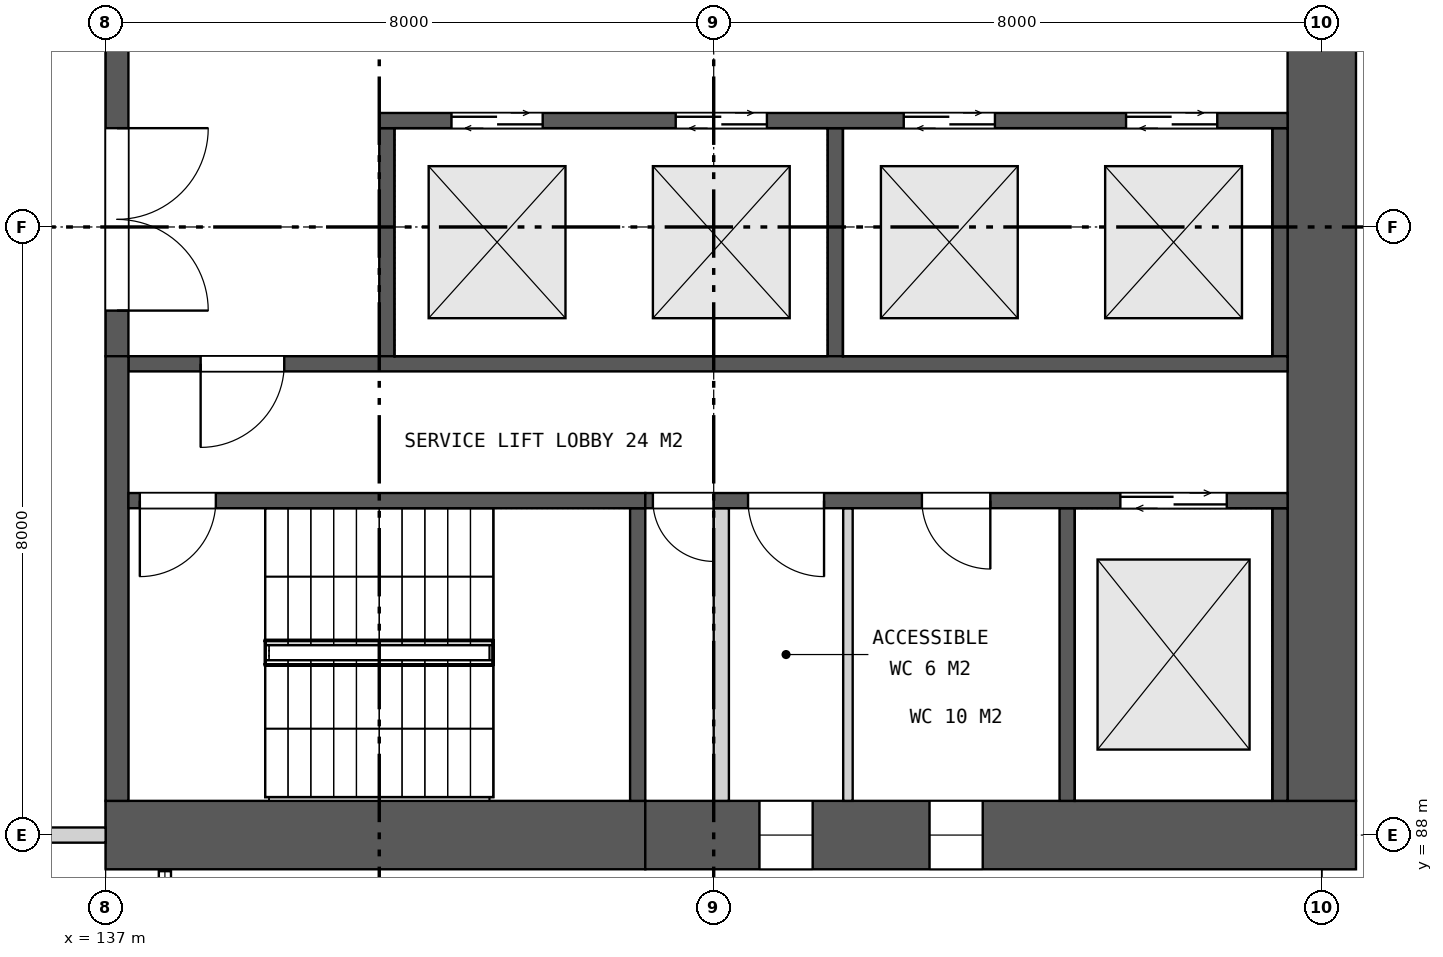
"""IFC4 building model, lengths in metres.
Left out: names, types, materials, properties, quantities, classifications, styles, units other than length and angle.
Written with IfcOpenShell. Run it as: python <this file> out.ifc"""

import sys

from ifc_helpers import new_model, si_unit, direction, frame, frame_2d, origin, place, context, subcontext, project, spatial, rectangle, extrude, element, fill, save


model = new_model("IFC4")
c1 = context("Model", 3, precision=1e-05, world=origin(), true_north=direction((0.0, 1.0)))
c2 = subcontext(c1, "Body", "Model", "MODEL_VIEW")
j1 = project(units=[si_unit("LENGTHUNIT", "METRE"), si_unit("PLANEANGLEUNIT", "RADIAN")], contexts=[c1])
p1 = place(None, origin())
s1 = spatial("IfcSite", under=j1, at=p1, CompositionType="ELEMENT")
p2 = place(p1, origin())
s2 = spatial("IfcBuilding", under=s1, at=p2, CompositionType="ELEMENT")
p3 = place(p2, frame((0.0, 0.0, 41.5)))
s3 = spatial("IfcBuildingStorey", under=s2, at=p3, CompositionType="ELEMENT", Elevation=41.5)
p4 = place(p3, frame((137.0, 88.0, 0.0), z_axis=(0.0, 0.0, 1.0), x_axis=(1.0, 0.0, 0.0)))
e1 = element("IfcWall", 1, at=p4, inside=s3, PredefinedType="SHEAR", context=c2, shape_type="SweptSolid", body=[
    extrude(rectangle(XDim=7.1, YDim=0.9, at=frame_2d((3.55, 0.0))), origin(), (0.0, 0.0, 1.0), 6.0),
])
p5 = place(p3, frame((144.1, 88.0, 0.0), z_axis=(0.0, 0.0, 1.0), x_axis=(1.0, 0.0, 0.0)))
e2 = element("IfcWall", 2, at=p5, inside=s3, PredefinedType="SHEAR", context=c2, shape_type="SweptSolid", body=[
    extrude(rectangle(XDim=9.35, YDim=0.9, at=frame_2d((4.675, 0.0))), origin(), (0.0, 0.0, 1.0), 6.0),
])
p6 = place(p5, frame((1.502, 0.0, 1.5)))
e3 = element("IfcOpeningElement", 3, at=p6, cuts=e2, PredefinedType="OPENING", context=c2, shape_type="SweptSolid", body=[
    extrude(rectangle(XDim=0.7, YDim=0.9, at=frame_2d((0.35, 0.45))), frame((0.0, 0.46, 0.0), z_axis=(0.0, -1.0, 0.0), x_axis=(1.0, 0.0, 0.0)), (0.0, 0.0, 1.0), 0.92),
])
p7 = place(p5, frame((3.739, 0.0, 1.5)))
e4 = element("IfcOpeningElement", 4, at=p7, cuts=e2, PredefinedType="OPENING", context=c2, shape_type="SweptSolid", body=[
    extrude(rectangle(XDim=0.7, YDim=0.9, at=frame_2d((0.35, 0.45))), frame((0.0, 0.46, 0.0), z_axis=(0.0, -1.0, 0.0), x_axis=(1.0, 0.0, 0.0)), (0.0, 0.0, 1.0), 0.92),
])
p8 = place(p3, frame((153.0, 88.45, 0.0), z_axis=(0.0, 0.0, 1.0), x_axis=(0.0, 1.0, 0.0)))
e5 = element("IfcWall", 5, at=p8, inside=s3, PredefinedType="SHEAR", context=c2, shape_type="SweptSolid", body=[
    extrude(rectangle(XDim=23.1, YDim=0.9, at=frame_2d((11.55, 0.0))), origin(), (0.0, 0.0, 1.0), 6.0),
])
p9 = place(p8, frame((10.35, 0.0, 0.0)))
e6 = element("IfcOpeningElement", 6, at=p9, cuts=e5, PredefinedType="OPENING", context=c2, shape_type="SweptSolid", body=[
    extrude(rectangle(XDim=2.4, YDim=2.4, at=frame_2d((1.2, 1.2))), frame((0.0, 0.46, 0.0), z_axis=(0.0, -1.0, 0.0), x_axis=(1.0, 0.0, 0.0)), (0.0, 0.0, 1.0), 0.92),
])
p10 = place(p3, frame((137.15, 94.3, 0.0), z_axis=(0.0, 0.0, 1.0), x_axis=(0.0, 1.0, 0.0)))
e7 = element("IfcWall", 7, at=p10, inside=s3, PredefinedType="SHEAR", context=c2, shape_type="SweptSolid", body=[
    extrude(rectangle(XDim=11.4, YDim=0.3, at=frame_2d((5.7, 0.0))), origin(), (0.0, 0.0, 1.0), 6.0),
])
p11 = place(p10, frame((0.6, 0.0, 0.0)))
e8 = element("IfcOpeningElement", 8, at=p11, cuts=e7, PredefinedType="OPENING", context=c2, shape_type="SweptSolid", body=[
    extrude(rectangle(XDim=2.4, YDim=2.4, at=frame_2d((1.2, 1.2))), frame((0.0, 0.16, 0.0), z_axis=(0.0, -1.0, 0.0), x_axis=(1.0, 0.0, 0.0)), (0.0, 0.0, 1.0), 0.32),
])
p12 = place(p10, frame((4.5, 0.0, 0.0)))
e9 = element("IfcOpeningElement", 9, at=p12, cuts=e7, PredefinedType="OPENING", context=c2, shape_type="SweptSolid", body=[
    extrude(rectangle(XDim=2.4, YDim=2.4, at=frame_2d((1.2, 1.2))), frame((0.0, 0.16, 0.0), z_axis=(0.0, -1.0, 0.0), x_axis=(1.0, 0.0, 0.0)), (0.0, 0.0, 1.0), 0.32),
])
p13 = place(p10, frame((8.4, 0.0, 0.0)))
e10 = element("IfcOpeningElement", 10, at=p13, cuts=e7, PredefinedType="OPENING", context=c2, shape_type="SweptSolid", body=[
    extrude(rectangle(XDim=2.4, YDim=2.4, at=frame_2d((1.2, 1.2))), frame((0.0, 0.16, 0.0), z_axis=(0.0, -1.0, 0.0), x_axis=(1.0, 0.0, 0.0)), (0.0, 0.0, 1.0), 0.32),
])
for number, where, z_axis, x_axis in (
    (11, (140.7, 94.3, 0.0), (0.0, 0.0, 1.0), (0.0, 1.0, 0.0)),
    (12, (146.6, 94.3, 0.0), (0.0, 0.0, 1.0), (0.0, 1.0, 0.0)),
    (13, (152.45, 94.3, 0.0), (0.0, 0.0, 1.0), (0.0, 1.0, 0.0)),
):
    element("IfcWall", number, at=place(p3, frame(where, z_axis=z_axis, x_axis=x_axis)), inside=s3, PredefinedType="SHEAR", context=c2, shape_type="SweptSolid", body=[
        extrude(rectangle(XDim=3.0, YDim=0.2, at=frame_2d((1.5, 0.0))), origin(), (0.0, 0.0, 1.0), 6.0),
    ])
p14 = place(p3, frame((140.6, 97.4, 0.0), z_axis=(0.0, 0.0, 1.0), x_axis=(1.0, 0.0, 0.0)))
e14 = element("IfcWall", 14, at=p14, inside=s3, PredefinedType="SHEAR", context=c2, shape_type="SweptSolid", body=[
    extrude(rectangle(XDim=11.95, YDim=0.2, at=frame_2d((5.975, 0.0))), origin(), (0.0, 0.0, 1.0), 6.0),
])
p15 = place(p14, frame((0.95, 0.0, 0.0)))
e15 = element("IfcOpeningElement", 15, at=p15, cuts=e14, PredefinedType="OPENING", context=c2, shape_type="SweptSolid", body=[
    extrude(rectangle(XDim=1.2, YDim=2.1, at=frame_2d((0.6, 1.05))), frame((0.0, 0.11, 0.0), z_axis=(0.0, -1.0, 0.0), x_axis=(1.0, 0.0, 0.0)), (0.0, 0.0, 1.0), 0.22),
])
p16 = place(p14, frame((3.9, 0.0, 0.0)))
e16 = element("IfcOpeningElement", 16, at=p16, cuts=e14, PredefinedType="OPENING", context=c2, shape_type="SweptSolid", body=[
    extrude(rectangle(XDim=1.2, YDim=2.1, at=frame_2d((0.6, 1.05))), frame((0.0, 0.11, 0.0), z_axis=(0.0, -1.0, 0.0), x_axis=(1.0, 0.0, 0.0)), (0.0, 0.0, 1.0), 0.22),
])
p17 = place(p14, frame((6.9, 0.0, 0.0)))
e17 = element("IfcOpeningElement", 17, at=p17, cuts=e14, PredefinedType="OPENING", context=c2, shape_type="SweptSolid", body=[
    extrude(rectangle(XDim=1.2, YDim=2.1, at=frame_2d((0.6, 1.05))), frame((0.0, 0.11, 0.0), z_axis=(0.0, -1.0, 0.0), x_axis=(1.0, 0.0, 0.0)), (0.0, 0.0, 1.0), 0.22),
])
p18 = place(p14, frame((9.825, 0.0, 0.0)))
e18 = element("IfcOpeningElement", 18, at=p18, cuts=e14, PredefinedType="OPENING", context=c2, shape_type="SweptSolid", body=[
    extrude(rectangle(XDim=1.2, YDim=2.1, at=frame_2d((0.6, 1.05))), frame((0.0, 0.11, 0.0), z_axis=(0.0, -1.0, 0.0), x_axis=(1.0, 0.0, 0.0)), (0.0, 0.0, 1.0), 0.22),
])
p19 = place(p3, frame((137.3, 94.2, 0.0), z_axis=(0.0, 0.0, 1.0), x_axis=(1.0, 0.0, 0.0)))
e19 = element("IfcWall", 19, at=p19, inside=s3, PredefinedType="SHEAR", context=c2, shape_type="SweptSolid", body=[
    extrude(rectangle(XDim=15.25, YDim=0.2, at=frame_2d((7.625, 0.0))), origin(), (0.0, 0.0, 1.0), 6.0),
])
p20 = place(p19, frame((0.95, 0.0, 0.0)))
e20 = element("IfcOpeningElement", 20, at=p20, cuts=e19, PredefinedType="OPENING", context=c2, shape_type="SweptSolid", body=[
    extrude(rectangle(XDim=1.1, YDim=2.1, at=frame_2d((0.55, 1.05))), frame((0.0, 0.11, 0.0), z_axis=(0.0, -1.0, 0.0), x_axis=(1.0, 0.0, 0.0)), (0.0, 0.0, 1.0), 0.22),
])
p21 = place(p3, frame((137.15, 88.45, 0.0), z_axis=(0.0, 0.0, 1.0), x_axis=(0.0, 1.0, 0.0)))
e21 = element("IfcWall", 21, at=p21, inside=s3, PredefinedType="SHEAR", context=c2, shape_type="SweptSolid", body=[
    extrude(rectangle(XDim=5.85, YDim=0.3, at=frame_2d((2.925, 0.0))), origin(), (0.0, 0.0, 1.0), 6.0),
])
for number, where, z_axis, x_axis in (
    (22, (144.0, 88.45, 0.0), (0.0, 0.0, 1.0), (0.0, 1.0, 0.0)),
    (23, (149.65, 88.45, 0.0), (0.0, 0.0, 1.0), (0.0, 1.0, 0.0)),
    (24, (152.45, 88.45, 0.0), (0.0, 0.0, 1.0), (0.0, 1.0, 0.0)),
):
    element("IfcWall", number, at=place(p3, frame(where, z_axis=z_axis, x_axis=x_axis)), inside=s3, PredefinedType="SHEAR", context=c2, shape_type="SweptSolid", body=[
        extrude(rectangle(XDim=3.85, YDim=0.2, at=frame_2d((1.925, 0.0))), origin(), (0.0, 0.0, 1.0), 6.0),
    ])
p22 = place(p3, frame((145.1, 88.45, 0.0), z_axis=(0.0, 0.0, 1.0), x_axis=(0.0, 1.0, 0.0)))
e25 = element("IfcWall", 25, at=p22, inside=s3, PredefinedType="PARTITIONING", context=c2, shape_type="SweptSolid", body=[
    extrude(rectangle(XDim=3.85, YDim=0.2, at=frame_2d((1.925, 0.0))), origin(), (0.0, 0.0, 1.0), 6.0),
])
p23 = place(p3, frame((146.766, 88.45, 0.0), z_axis=(0.0, 0.0, 1.0), x_axis=(0.0, 1.0, 0.0)))
e26 = element("IfcWall", 26, at=p23, inside=s3, PredefinedType="PARTITIONING", context=c2, shape_type="SweptSolid", body=[
    extrude(rectangle(XDim=3.85, YDim=0.125, at=frame_2d((1.925, 0.0))), origin(), (0.0, 0.0, 1.0), 6.0),
])
p24 = place(p3, frame((137.3, 92.4, 0.0), z_axis=(0.0, 0.0, 1.0), x_axis=(1.0, 0.0, 0.0)))
e27 = element("IfcWall", 27, at=p24, inside=s3, PredefinedType="SHEAR", context=c2, shape_type="SweptSolid", body=[
    extrude(rectangle(XDim=6.8, YDim=0.2, at=frame_2d((3.4, 0.0))), origin(), (0.0, 0.0, 1.0), 6.0),
])
p25 = place(p24, frame((0.15, 0.0, 0.0)))
e28 = element("IfcOpeningElement", 28, at=p25, cuts=e27, PredefinedType="OPENING", context=c2, shape_type="SweptSolid", body=[
    extrude(rectangle(XDim=1.0, YDim=2.1, at=frame_2d((0.5, 1.05))), frame((0.0, 0.11, 0.0), z_axis=(0.0, -1.0, 0.0), x_axis=(1.0, 0.0, 0.0)), (0.0, 0.0, 1.0), 0.22),
])
p26 = place(p3, frame((144.1, 92.4, 0.0), z_axis=(0.0, 0.0, 1.0), x_axis=(1.0, 0.0, 0.0)))
e29 = element("IfcWall", 29, at=p26, inside=s3, PredefinedType="SHEAR", context=c2, shape_type="SweptSolid", body=[
    extrude(rectangle(XDim=8.45, YDim=0.2, at=frame_2d((4.225, 0.0))), origin(), (0.0, 0.0, 1.0), 6.0),
])
p27 = place(p26, frame((0.1, 0.0, 0.0)))
e30 = element("IfcOpeningElement", 30, at=p27, cuts=e29, PredefinedType="OPENING", context=c2, shape_type="SweptSolid", body=[
    extrude(rectangle(XDim=0.8, YDim=2.1, at=frame_2d((0.4, 1.05))), frame((0.0, 0.11, 0.0), z_axis=(0.0, -1.0, 0.0), x_axis=(1.0, 0.0, 0.0)), (0.0, 0.0, 1.0), 0.22),
])
p28 = place(p26, frame((1.352, 0.0, 0.0)))
e31 = element("IfcOpeningElement", 31, at=p28, cuts=e29, PredefinedType="OPENING", context=c2, shape_type="SweptSolid", body=[
    extrude(rectangle(XDim=1.0, YDim=2.1, at=frame_2d((0.5, 1.05))), frame((0.0, 0.11, 0.0), z_axis=(0.0, -1.0, 0.0), x_axis=(1.0, 0.0, 0.0)), (0.0, 0.0, 1.0), 0.22),
])
p29 = place(p26, frame((3.639, 0.0, 0.0)))
e32 = element("IfcOpeningElement", 32, at=p29, cuts=e29, PredefinedType="OPENING", context=c2, shape_type="SweptSolid", body=[
    extrude(rectangle(XDim=0.9, YDim=2.1, at=frame_2d((0.45, 1.05))), frame((0.0, 0.11, 0.0), z_axis=(0.0, -1.0, 0.0), x_axis=(1.0, 0.0, 0.0)), (0.0, 0.0, 1.0), 0.22),
])
p30 = place(p26, frame((6.25, 0.0, 0.0)))
e33 = element("IfcOpeningElement", 33, at=p30, cuts=e29, PredefinedType="OPENING", context=c2, shape_type="SweptSolid", body=[
    extrude(rectangle(XDim=1.4, YDim=2.1, at=frame_2d((0.7, 1.05))), frame((0.0, 0.11, 0.0), z_axis=(0.0, -1.0, 0.0), x_axis=(1.0, 0.0, 0.0)), (0.0, 0.0, 1.0), 0.22),
])
p31 = place(p3, frame((129.6, 88.0, 0.0), z_axis=(0.0, 0.0, 1.0), x_axis=(1.0, 0.0, 0.0)))
e34 = element("IfcWall", 34, at=p31, inside=s3, PredefinedType="PARTITIONING", context=c2, shape_type="SweptSolid", body=[
    extrude(rectangle(XDim=7.4, YDim=0.2, at=frame_2d((3.7, 0.0))), origin(), (0.0, 0.0, 1.0), 5.055),
])
p32 = place(p6, origin())
e35 = element("IfcWindow", 35, at=p32, inside=s3, PartitioningType="SINGLE_PANEL", PredefinedType="WINDOW", context=c2, shape_type="SweptSolid", body=[
    extrude(rectangle(XDim=0.7, YDim=0.9, at=frame_2d((0.35, 0.45))), frame((0.0, 0.03, 0.0), z_axis=(0.0, -1.0, 0.0), x_axis=(1.0, 0.0, 0.0)), (0.0, 0.0, 1.0), 0.06),
])
fill(e3, e35)
p33 = place(p7, origin())
e36 = element("IfcWindow", 36, at=p33, inside=s3, PartitioningType="SINGLE_PANEL", PredefinedType="WINDOW", context=c2, shape_type="SweptSolid", body=[
    extrude(rectangle(XDim=0.7, YDim=0.9, at=frame_2d((0.35, 0.45))), frame((0.0, 0.03, 0.0), z_axis=(0.0, -1.0, 0.0), x_axis=(1.0, 0.0, 0.0)), (0.0, 0.0, 1.0), 0.06),
])
fill(e4, e36)
p34 = place(p11, frame((2.4, 0.0, 0.0), z_axis=(0.0, 0.0, 1.0), x_axis=(-1.0, 0.0, 0.0)))
e37 = element("IfcDoor", 37, at=p34, inside=s3, OperationType="DOUBLE_DOOR_SINGLE_SWING", PredefinedType="DOOR", context=c2, shape_type="SweptSolid", body=[
    extrude(rectangle(XDim=2.4, YDim=2.4, at=frame_2d((1.2, 1.2))), frame((0.0, 0.025, 0.0), z_axis=(0.0, -1.0, 0.0), x_axis=(1.0, 0.0, 0.0)), (0.0, 0.0, 1.0), 0.05),
])
fill(e8, e37)
p35 = place(p15, origin())
e38 = element("IfcDoor", 38, at=p35, inside=s3, OperationType="DOUBLE_DOOR_SLIDING", PredefinedType="DOOR", context=c2, shape_type="SweptSolid", body=[
    extrude(rectangle(XDim=1.2, YDim=2.1, at=frame_2d((0.6, 1.05))), frame((0.0, 0.025, 0.0), z_axis=(0.0, -1.0, 0.0), x_axis=(1.0, 0.0, 0.0)), (0.0, 0.0, 1.0), 0.05),
])
fill(e15, e38)
p36 = place(p16, origin())
e39 = element("IfcDoor", 39, at=p36, inside=s3, OperationType="DOUBLE_DOOR_SLIDING", PredefinedType="DOOR", context=c2, shape_type="SweptSolid", body=[
    extrude(rectangle(XDim=1.2, YDim=2.1, at=frame_2d((0.6, 1.05))), frame((0.0, 0.025, 0.0), z_axis=(0.0, -1.0, 0.0), x_axis=(1.0, 0.0, 0.0)), (0.0, 0.0, 1.0), 0.05),
])
fill(e16, e39)
p37 = place(p17, origin())
e40 = element("IfcDoor", 40, at=p37, inside=s3, OperationType="DOUBLE_DOOR_SLIDING", PredefinedType="DOOR", context=c2, shape_type="SweptSolid", body=[
    extrude(rectangle(XDim=1.2, YDim=2.1, at=frame_2d((0.6, 1.05))), frame((0.0, 0.025, 0.0), z_axis=(0.0, -1.0, 0.0), x_axis=(1.0, 0.0, 0.0)), (0.0, 0.0, 1.0), 0.05),
])
fill(e17, e40)
p38 = place(p18, origin())
e41 = element("IfcDoor", 41, at=p38, inside=s3, OperationType="DOUBLE_DOOR_SLIDING", PredefinedType="DOOR", context=c2, shape_type="SweptSolid", body=[
    extrude(rectangle(XDim=1.2, YDim=2.1, at=frame_2d((0.6, 1.05))), frame((0.0, 0.025, 0.0), z_axis=(0.0, -1.0, 0.0), x_axis=(1.0, 0.0, 0.0)), (0.0, 0.0, 1.0), 0.05),
])
fill(e18, e41)
p39 = place(p20, frame((1.1, 0.0, 0.0), z_axis=(0.0, 0.0, 1.0), x_axis=(-1.0, 0.0, 0.0)))
e42 = element("IfcDoor", 42, at=p39, inside=s3, OperationType="SINGLE_SWING_RIGHT", PredefinedType="DOOR", context=c2, shape_type="SweptSolid", body=[
    extrude(rectangle(XDim=1.1, YDim=2.1, at=frame_2d((0.55, 1.05))), frame((0.0, 0.025, 0.0), z_axis=(0.0, -1.0, 0.0), x_axis=(1.0, 0.0, 0.0)), (0.0, 0.0, 1.0), 0.05),
])
fill(e20, e42)
p40 = place(p25, frame((1.0, 0.0, 0.0), z_axis=(0.0, 0.0, 1.0), x_axis=(-1.0, 0.0, 0.0)))
e43 = element("IfcDoor", 43, at=p40, inside=s3, OperationType="SINGLE_SWING_RIGHT", PredefinedType="DOOR", context=c2, shape_type="SweptSolid", body=[
    extrude(rectangle(XDim=1.0, YDim=2.1, at=frame_2d((0.5, 1.05))), frame((0.0, 0.025, 0.0), z_axis=(0.0, -1.0, 0.0), x_axis=(1.0, 0.0, 0.0)), (0.0, 0.0, 1.0), 0.05),
])
fill(e28, e43)
p41 = place(p27, frame((0.8, 0.0, 0.0), z_axis=(0.0, 0.0, 1.0), x_axis=(-1.0, 0.0, 0.0)))
e44 = element("IfcDoor", 44, at=p41, inside=s3, OperationType="SINGLE_SWING_LEFT", PredefinedType="DOOR", context=c2, shape_type="SweptSolid", body=[
    extrude(rectangle(XDim=0.8, YDim=2.1, at=frame_2d((0.4, 1.05))), frame((0.0, 0.025, 0.0), z_axis=(0.0, -1.0, 0.0), x_axis=(1.0, 0.0, 0.0)), (0.0, 0.0, 1.0), 0.05),
])
fill(e30, e44)
p42 = place(p28, frame((1.0, 0.0, 0.0), z_axis=(0.0, 0.0, 1.0), x_axis=(-1.0, 0.0, 0.0)))
e45 = element("IfcDoor", 45, at=p42, inside=s3, OperationType="SINGLE_SWING_LEFT", PredefinedType="DOOR", context=c2, shape_type="SweptSolid", body=[
    extrude(rectangle(XDim=1.0, YDim=2.1, at=frame_2d((0.5, 1.05))), frame((0.0, 0.025, 0.0), z_axis=(0.0, -1.0, 0.0), x_axis=(1.0, 0.0, 0.0)), (0.0, 0.0, 1.0), 0.05),
])
fill(e31, e45)
p43 = place(p29, frame((0.9, 0.0, 0.0), z_axis=(0.0, 0.0, 1.0), x_axis=(-1.0, 0.0, 0.0)))
e46 = element("IfcDoor", 46, at=p43, inside=s3, OperationType="SINGLE_SWING_LEFT", PredefinedType="DOOR", context=c2, shape_type="SweptSolid", body=[
    extrude(rectangle(XDim=0.9, YDim=2.1, at=frame_2d((0.45, 1.05))), frame((0.0, 0.025, 0.0), z_axis=(0.0, -1.0, 0.0), x_axis=(1.0, 0.0, 0.0)), (0.0, 0.0, 1.0), 0.05),
])
fill(e32, e46)
p44 = place(p30, origin())
e47 = element("IfcDoor", 47, at=p44, inside=s3, OperationType="DOUBLE_DOOR_SLIDING", PredefinedType="DOOR", context=c2, shape_type="SweptSolid", body=[
    extrude(rectangle(XDim=1.4, YDim=2.1, at=frame_2d((0.7, 1.05))), frame((0.0, 0.025, 0.0), z_axis=(0.0, -1.0, 0.0), x_axis=(1.0, 0.0, 0.0)), (0.0, 0.0, 1.0), 0.05),
])
fill(e33, e47)
save(model, sys.argv[1])
